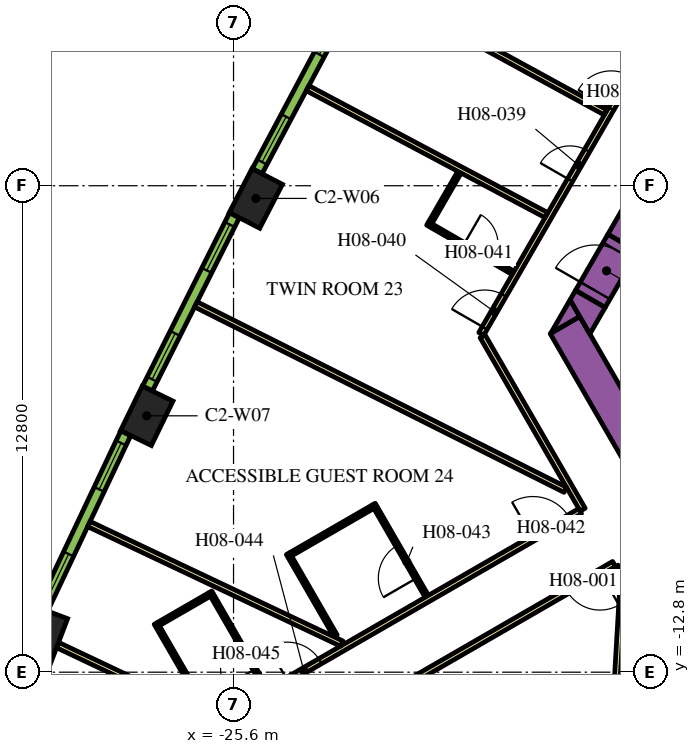
"""IFC4 building model, lengths in metres.
Left out: names, types, materials, properties, quantities, classifications, styles, units other than length and angle.
Written with IfcOpenShell. Run it as: python <this file> out.ifc"""

import sys

from ifc_helpers import new_model, si_unit, direction, frame, frame_2d, origin, origin_2d, place, context, subcontext, project, spatial, polyline, rectangle, outline, extrude, element, fill, save


model = new_model("IFC4")
c1 = context("Model", 3, precision=1e-05, world=origin(), true_north=direction((0.0, 1.0)))
c2 = subcontext(c1, "Body", "Model", "MODEL_VIEW")
j1 = project(units=[si_unit("LENGTHUNIT", "METRE"), si_unit("PLANEANGLEUNIT", "RADIAN")], contexts=[c1])
p1 = place(None, origin())
s1 = spatial("IfcSite", under=j1, at=p1, CompositionType="ELEMENT")
p2 = place(p1, origin())
s2 = spatial("IfcBuilding", under=s1, at=p2, CompositionType="ELEMENT")
p3 = place(p2, frame((0.0, 0.0, 111.0)))
s3 = spatial("IfcBuildingStorey", under=s2, at=p3, CompositionType="ELEMENT", Elevation=111.0)
for number, where, z_axis, x_axis in (
    (1, (-25.012, -0.334, 0.0), (0.0, 0.0, 1.0), (-0.459, -0.888, 0.0)),
    (2, (-27.883, -6.054, 0.0), (0.0, 0.0, 1.0), (-0.438, -0.899, 0.0)),
    (3, (-30.619, -11.839, 0.0), (0.0, 0.0, 1.0), (-0.355, -0.935, 0.0)),
):
    element("IfcColumn", number, at=place(p3, frame(where, z_axis=z_axis, x_axis=x_axis)), inside=s3, PredefinedType="COLUMN", context=c2, shape_type="SweptSolid", body=[
        extrude(rectangle(XDim=1.3, YDim=0.9, at=origin_2d()), origin(), (0.0, 0.0, 1.0), 3.9),
    ])
p4 = place(p3, frame((-15.36, -1.503, 0.0), z_axis=(0.0, 0.0, 1.0), x_axis=(0.50000389221, 0.866023156604, 0.0)))
e4 = element("IfcWall", 4, at=p4, inside=s3, PredefinedType="SOLIDWALL", context=c2, shape_type="SweptSolid", body=[
    extrude(rectangle(XDim=21.0, YDim=0.9, at=frame_2d((10.5, 0.0))), origin(), (0.0, 0.0, 1.0), 3.9),
])
p5 = place(p3, frame((-12.134, -11.883, 0.0), z_axis=(0.0, 0.0, 1.0), x_axis=(-0.500005339912, 0.866022320763, 0.0)))
e5 = element("IfcWall", 5, at=p5, inside=s3, PredefinedType="SOLIDWALL", context=c2, shape_type="SweptSolid", body=[
    extrude(rectangle(XDim=9.488, YDim=0.9, at=frame_2d((4.744, 0.0))), origin(), (0.0, 0.0, 1.0), 3.9),
])
p6 = place(p3, origin())
e6 = element("IfcWall", 6, at=p6, inside=s3, PredefinedType="SOLIDWALL", context=c2, shape_type="SweptSolid", body=[
    extrude(outline(polyline([(-16.489, -3.44), (-17.251, -3.88), (-16.743, -3.0), (-16.489, -3.44)])), origin(), (0.0, 0.0, 1.0), 3.9),
])
e7 = element("IfcWall", 7, at=p6, inside=s3, PredefinedType="SOLIDWALL", context=c2, shape_type="SweptSolid", body=[
    extrude(outline(polyline([(-15.82, -3.201), (-16.223, -3.9), (-16.743, -3.0), (-16.599, -2.751), (-15.82, -3.201)])), origin(), (0.0, 0.0, 1.0), 3.9),
])
p7 = place(p3, frame((-16.209, -2.976, 0.0), z_axis=(0.0, 0.0, 1.0), x_axis=(0.499954529098, 0.86605165483, 0.0)))
e8 = element("IfcWall", 8, at=p7, inside=s3, PredefinedType="SOLIDWALL", context=c2, shape_type="SweptSolid", body=[
    extrude(rectangle(XDim=1.7, YDim=0.9, at=frame_2d((0.85, 0.0))), origin(), (0.0, 0.0, 1.0), 3.9),
])
p8 = place(p7, frame((0.25, 0.0, 0.0)))
e9 = element("IfcOpeningElement", 9, at=p8, cuts=e8, PredefinedType="OPENING", context=c2, shape_type="SweptSolid", body=[
    extrude(rectangle(XDim=1.2, YDim=2.1, at=frame_2d((0.6, 1.05))), frame((0.0, 0.46, 0.0), z_axis=(0.0, -1.0, 0.0), x_axis=(1.0, 0.0, 0.0)), (0.0, 0.0, 1.0), 0.92),
])
p9 = place(p3, frame((-19.081, -3.9, 0.0), z_axis=(0.0, 0.0, 1.0), x_axis=(0.499998313975, 0.866026377209, 0.0)))
e10 = element("IfcWall", 10, at=p9, inside=s3, PredefinedType="PARTITIONING", context=c2, shape_type="SweptSolid", body=[
    extrude(rectangle(XDim=25.766, YDim=0.15, at=frame_2d((12.883, 0.0))), origin(), (0.0, 0.0, 1.0), 2.75),
])
p10 = place(p9, frame((19.306, 0.0, 0.0)))
e11 = element("IfcOpeningElement", 11, at=p10, cuts=e10, PredefinedType="OPENING", context=c2, shape_type="SweptSolid", body=[
    extrude(rectangle(XDim=1.0, YDim=2.1, at=frame_2d((0.5, 1.05))), frame((0.0, 0.085, 0.0), z_axis=(0.0, -1.0, 0.0), x_axis=(1.0, 0.0, 0.0)), (0.0, 0.0, 1.0), 0.17),
])
p11 = place(p9, frame((18.0, 0.0, 0.0)))
e12 = element("IfcOpeningElement", 12, at=p11, cuts=e10, PredefinedType="OPENING", context=c2, shape_type="SweptSolid", body=[
    extrude(rectangle(XDim=1.0, YDim=2.1, at=frame_2d((0.5, 1.05))), frame((0.0, 0.085, 0.0), z_axis=(0.0, -1.0, 0.0), x_axis=(1.0, 0.0, 0.0)), (0.0, 0.0, 1.0), 0.17),
])
p12 = place(p9, frame((6.838, 0.0, 0.0)))
e13 = element("IfcOpeningElement", 13, at=p12, cuts=e10, PredefinedType="OPENING", context=c2, shape_type="SweptSolid", body=[
    extrude(rectangle(XDim=1.0, YDim=2.1, at=frame_2d((0.5, 1.05))), frame((0.0, 0.085, 0.0), z_axis=(0.0, -1.0, 0.0), x_axis=(1.0, 0.0, 0.0)), (0.0, 0.0, 1.0), 0.17),
])
p13 = place(p9, frame((4.674, 0.0, 0.0)))
e14 = element("IfcOpeningElement", 14, at=p13, cuts=e10, PredefinedType="OPENING", context=c2, shape_type="SweptSolid", body=[
    extrude(rectangle(XDim=0.9, YDim=2.1, at=frame_2d((0.45, 1.05))), frame((0.0, 0.085, 0.0), z_axis=(0.0, -1.0, 0.0), x_axis=(1.0, 0.0, 0.0)), (0.0, 0.0, 1.0), 0.17),
])
p14 = place(p9, frame((0.18, 0.0, 0.0)))
e15 = element("IfcOpeningElement", 15, at=p14, cuts=e10, PredefinedType="OPENING", context=c2, shape_type="SweptSolid", body=[
    extrude(rectangle(XDim=1.0, YDim=2.1, at=frame_2d((0.5, 1.05))), frame((0.0, 0.085, 0.0), z_axis=(0.0, -1.0, 0.0), x_axis=(1.0, 0.0, 0.0)), (0.0, 0.0, 1.0), 0.17),
])
p15 = place(p3, frame((-16.412, -8.523, 0.0), z_axis=(0.0, 0.0, 1.0), x_axis=(-0.500001929737, 0.866024289647, 0.0)))
e16 = element("IfcWall", 16, at=p15, inside=s3, PredefinedType="PARTITIONING", context=c2, shape_type="SweptSolid", body=[
    extrude(rectangle(XDim=5.268, YDim=0.15, at=frame_2d((2.634, 0.0))), origin(), (0.0, 0.0, 1.0), 2.75),
])
p16 = place(p3, frame((-28.211, -15.335, 0.0), z_axis=(0.0, 0.0, 1.0), x_axis=(0.866025884867, 0.49999916674, 0.0)))
e17 = element("IfcWall", 17, at=p16, inside=s3, PredefinedType="PARTITIONING", context=c2, shape_type="SweptSolid", body=[
    extrude(rectangle(XDim=13.543, YDim=0.15, at=frame_2d((6.772, 0.0))), origin(), (0.0, 0.0, 1.0), 2.75),
])
p17 = place(p16, frame((12.114, 0.0, 0.0)))
e18 = element("IfcOpeningElement", 18, at=p17, cuts=e17, PredefinedType="OPENING", context=c2, shape_type="SweptSolid", body=[
    extrude(rectangle(XDim=1.1, YDim=2.1, at=frame_2d((0.55, 1.05))), frame((0.0, 0.085, 0.0), z_axis=(0.0, -1.0, 0.0), x_axis=(1.0, 0.0, 0.0)), (0.0, 0.0, 1.0), 0.17),
])
p18 = place(p16, frame((4.65, 0.0, 0.0)))
e19 = element("IfcOpeningElement", 19, at=p18, cuts=e17, PredefinedType="OPENING", context=c2, shape_type="SweptSolid", body=[
    extrude(rectangle(XDim=1.0, YDim=2.1, at=frame_2d((0.5, 1.05))), frame((0.0, 0.085, 0.0), z_axis=(0.0, -1.0, 0.0), x_axis=(1.0, 0.0, 0.0)), (0.0, 0.0, 1.0), 0.17),
])
p19 = place(p3, frame((-15.587, -9.952, 0.0), z_axis=(0.0, 0.0, 1.0), x_axis=(-0.866017869832, -0.500013048961, 0.0)))
e20 = element("IfcWall", 20, at=p19, inside=s3, PredefinedType="PARTITIONING", context=c2, shape_type="SweptSolid", body=[
    extrude(rectangle(XDim=13.624, YDim=0.15, at=frame_2d((6.812, 0.0))), origin(), (0.0, 0.0, 1.0), 2.75),
])
p20 = place(p19, frame((0.427, 0.0, 0.0)))
e21 = element("IfcOpeningElement", 21, at=p20, cuts=e20, PredefinedType="OPENING", context=c2, shape_type="SweptSolid", body=[
    extrude(rectangle(XDim=1.0, YDim=2.1, at=frame_2d((0.5, 1.05))), frame((0.0, 0.085, 0.0), z_axis=(0.0, -1.0, 0.0), x_axis=(1.0, 0.0, 0.0)), (0.0, 0.0, 1.0), 0.17),
])
p21 = place(p3, frame((-12.918, -14.575, 0.0), z_axis=(0.0, 0.0, 1.0), x_axis=(-0.500009150678, 0.866020120573, 0.0)))
e22 = element("IfcWall", 22, at=p21, inside=s3, PredefinedType="PARTITIONING", context=c2, shape_type="SweptSolid", body=[
    extrude(rectangle(XDim=5.258, YDim=0.15, at=frame_2d((2.629, 0.0))), origin(), (0.0, 0.0, 1.0), 2.75),
])
p22 = place(p3, frame((-30.231, -12.085, 0.0), z_axis=(0.0, 0.0, 1.0), x_axis=(0.904001132572, -0.427530060122, 0.0)))
e23 = element("IfcWall", 23, at=p22, inside=s3, PredefinedType="PARTITIONING", context=c2, shape_type="SweptSolid", body=[
    extrude(rectangle(XDim=4.51, YDim=0.15, at=frame_2d((2.255, 0.0))), origin(), (0.0, 0.0, 1.0), 2.75),
])
p23 = place(p3, frame((-29.406, -8.901, 0.0), z_axis=(0.0, 0.0, 1.0), x_axis=(0.904002363742, -0.427527456836, 0.0)))
e24 = element("IfcWall", 24, at=p23, inside=s3, PredefinedType="PARTITIONING", context=c2, shape_type="SweptSolid", body=[
    extrude(rectangle(XDim=7.362, YDim=0.15, at=frame_2d((3.681, 0.0))), origin(), (0.0, 0.0, 1.0), 2.75),
])
p24 = place(p3, frame((-23.652, 2.567, 0.0), z_axis=(0.0, 0.0, 1.0), x_axis=(0.883019237957, -0.469336793144, 0.0)))
e25 = element("IfcWall", 25, at=p24, inside=s3, PredefinedType="PARTITIONING", context=c2, shape_type="SweptSolid", body=[
    extrude(rectangle(XDim=7.111, YDim=0.15, at=frame_2d((3.555, 0.0))), origin(), (0.0, 0.0, 1.0), 2.75),
])
p25 = place(p3, frame((-26.591, -3.122, 0.0), z_axis=(0.0, 0.0, 1.0), x_axis=(0.893766213273, -0.448533115847, 0.0)))
e26 = element("IfcWall", 26, at=p25, inside=s3, PredefinedType="PARTITIONING", context=c2, shape_type="SweptSolid", body=[
    extrude(rectangle(XDim=10.875, YDim=0.15, at=frame_2d((5.438, 0.0))), origin(), (0.0, 0.0, 1.0), 2.75),
])
p26 = place(p3, frame((-21.614, 5.102, 0.0), z_axis=(0.0, 0.0, 1.0), x_axis=(0.877484555087, -0.479604895287, 0.0)))
e27 = element("IfcWall", 27, at=p26, inside=s3, PredefinedType="PARTITIONING", context=c2, shape_type="SweptSolid", body=[
    extrude(rectangle(XDim=6.611, YDim=0.15, at=frame_2d((3.306, 0.0))), origin(), (0.0, 0.0, 1.0), 2.75),
])
p27 = place(p3, frame((-15.999, -21.467, 0.0), z_axis=(0.0, 0.0, 1.0), x_axis=(0.058411453297, 0.998292593443, 0.0)))
e28 = element("IfcWall", 28, at=p27, inside=s3, PredefinedType="PARTITIONING", context=c2, shape_type="SweptSolid", body=[
    extrude(rectangle(XDim=10.875, YDim=0.15, at=frame_2d((5.438, 0.0))), origin(), (0.0, 0.0, 1.0), 2.75),
])
p28 = place(p3, frame((-20.492, -0.994, 0.0), z_axis=(0.0, 0.0, 1.0), x_axis=(0.865997922154, -0.500047596559, 0.0)))
e29 = element("IfcWall", 29, at=p28, inside=s3, PredefinedType="PARTITIONING", context=c2, shape_type="SweptSolid", body=[
    extrude(rectangle(XDim=2.6, YDim=0.1, at=frame_2d((1.3, 0.0))), origin(), (0.0, 0.0, 1.0), 2.75),
])
p29 = place(p28, frame((1.1, 0.0, 0.0)))
e30 = element("IfcOpeningElement", 30, at=p29, cuts=e29, PredefinedType="OPENING", context=c2, shape_type="SweptSolid", body=[
    extrude(rectangle(XDim=0.9, YDim=2.1, at=frame_2d((0.45, 1.05))), frame((0.0, 0.06, 0.0), z_axis=(0.0, -1.0, 0.0), x_axis=(1.0, 0.0, 0.0)), (0.0, 0.0, 1.0), 0.12),
])
p30 = place(p3, frame((-20.424, -0.976, 0.0), z_axis=(0.0, 0.0, 1.0), x_axis=(0.500086174919, 0.865975644955, 0.0)))
e31 = element("IfcWall", 31, at=p30, inside=s3, PredefinedType="PARTITIONING", context=c2, shape_type="SweptSolid", body=[
    extrude(rectangle(XDim=1.53, YDim=0.1, at=frame_2d((0.765, 0.0))), origin(), (0.0, 0.0, 1.0), 2.75),
])
p31 = place(p3, frame((-20.515, -10.805, 0.0), z_axis=(0.0, 0.0, 1.0), x_axis=(-0.49994636267, 0.866056369097, 0.0)))
e32 = element("IfcWall", 32, at=p31, inside=s3, PredefinedType="PARTITIONING", context=c2, shape_type="SweptSolid", body=[
    extrude(rectangle(XDim=2.8, YDim=0.1, at=frame_2d((1.4, 0.0))), origin(), (0.0, 0.0, 1.0), 2.75),
])
p32 = place(p31, frame((0.55, 0.0, 0.0)))
e33 = element("IfcOpeningElement", 33, at=p32, cuts=e32, PredefinedType="OPENING", context=c2, shape_type="SweptSolid", body=[
    extrude(rectangle(XDim=1.0, YDim=2.1, at=frame_2d((0.5, 1.05))), frame((0.0, 0.06, 0.0), z_axis=(0.0, -1.0, 0.0), x_axis=(1.0, 0.0, 0.0)), (0.0, 0.0, 1.0), 0.12),
])
for number, where, z_axis, x_axis in (
    (34, (-21.933, -8.448, 0.0), (0.0, 0.0, 1.0), (-0.866, -0.5, 0.0)),
    (35, (-22.916, -11.845, 0.0), (0.0, 0.0, 1.0), (-0.5, 0.866, 0.0)),
):
    element("IfcWall", number, at=place(p3, frame(where, z_axis=z_axis, x_axis=x_axis)), inside=s3, PredefinedType="PARTITIONING", context=c2, shape_type="SweptSolid", body=[
        extrude(rectangle(XDim=2.5, YDim=0.1, at=frame_2d((1.25, 0.0))), origin(), (0.0, 0.0, 1.0), 2.75),
    ])
p33 = place(p3, frame((-24.74, -13.244, 0.0), z_axis=(0.0, 0.0, 1.0), x_axis=(-0.500037662692, 0.866003658127, 0.0)))
e36 = element("IfcWall", 36, at=p33, inside=s3, PredefinedType="PARTITIONING", context=c2, shape_type="SweptSolid", body=[
    extrude(rectangle(XDim=2.95, YDim=0.1, at=frame_2d((1.475, 0.0))), origin(), (0.0, 0.0, 1.0), 2.75),
])
p34 = place(p33, frame((0.6, 0.0, 0.0)))
e37 = element("IfcOpeningElement", 37, at=p34, cuts=e36, PredefinedType="OPENING", context=c2, shape_type="SweptSolid", body=[
    extrude(rectangle(XDim=0.9, YDim=2.1, at=frame_2d((0.45, 1.05))), frame((0.0, 0.06, 0.0), z_axis=(0.0, -1.0, 0.0), x_axis=(1.0, 0.0, 0.0)), (0.0, 0.0, 1.0), 0.12),
])
p35 = place(p3, frame((-26.233, -10.758, 0.0), z_axis=(0.0, 0.0, 1.0), x_axis=(-0.866043940782, -0.499967891604, 0.0)))
e38 = element("IfcWall", 38, at=p35, inside=s3, PredefinedType="PARTITIONING", context=c2, shape_type="SweptSolid", body=[
    extrude(rectangle(XDim=1.55, YDim=0.1, at=frame_2d((0.775, 0.0))), origin(), (0.0, 0.0, 1.0), 2.75),
])
p36 = place(p3, frame((-26.319, -13.81, 0.0), z_axis=(0.0, 0.0, 1.0), x_axis=(-0.499953715521, 0.866052124492, 0.0)))
e39 = element("IfcWall", 39, at=p36, inside=s3, PredefinedType="PARTITIONING", context=c2, shape_type="SweptSolid", body=[
    extrude(rectangle(XDim=2.65, YDim=0.1, at=frame_2d((1.325, 0.0))), origin(), (0.0, 0.0, 1.0), 2.75),
])
p37 = place(p3, frame((-22.583, 4.887, 0.0), z_axis=(0.0, 0.0, 1.0), x_axis=(-0.469323203119, -0.883026461106, 0.0)))
e40 = element("IfcWall", 40, at=p37, inside=s3, PredefinedType="SOLIDWALL", context=c2, shape_type="SweptSolid", body=[
    extrude(rectangle(XDim=5.101, YDim=0.29, at=frame_2d((2.55, 0.0))), origin(), (0.0, 0.0, 1.0), 3.65),
])
p38 = place(p37, frame((0.273, 0.0, 0.9)))
e41 = element("IfcOpeningElement", 41, at=p38, cuts=e40, PredefinedType="OPENING", context=c2, shape_type="SweptSolid", body=[
    extrude(rectangle(XDim=1.35, YDim=2.15, at=frame_2d((0.675, 1.075))), frame((0.0, 0.155, 0.0), z_axis=(0.0, -1.0, 0.0), x_axis=(1.0, 0.0, 0.0)), (0.0, 0.0, 1.0), 0.31),
])
p39 = place(p37, frame((3.478, 0.0, 0.9)))
e42 = element("IfcOpeningElement", 42, at=p39, cuts=e40, PredefinedType="OPENING", context=c2, shape_type="SweptSolid", body=[
    extrude(rectangle(XDim=1.35, YDim=2.15, at=frame_2d((0.675, 1.075))), frame((0.0, 0.155, 0.0), z_axis=(0.0, -1.0, 0.0), x_axis=(1.0, 0.0, 0.0)), (0.0, 0.0, 1.0), 0.31),
])
p40 = place(p3, frame((-25.576, -0.778, 0.0), z_axis=(0.0, 0.0, 1.0), x_axis=(-0.448534297211, -0.893765620409, 0.0)))
e43 = element("IfcWall", 43, at=p40, inside=s3, PredefinedType="SOLIDWALL", context=c2, shape_type="SweptSolid", body=[
    extrude(rectangle(XDim=5.1, YDim=0.29, at=frame_2d((2.55, 0.0))), origin(), (0.0, 0.0, 1.0), 3.65),
])
p41 = place(p40, frame((0.272, 0.0, 0.9)))
e44 = element("IfcOpeningElement", 44, at=p41, cuts=e43, PredefinedType="OPENING", context=c2, shape_type="SweptSolid", body=[
    extrude(rectangle(XDim=1.35, YDim=2.15, at=frame_2d((0.675, 1.075))), frame((0.0, 0.155, 0.0), z_axis=(0.0, -1.0, 0.0), x_axis=(1.0, 0.0, 0.0)), (0.0, 0.0, 1.0), 0.31),
])
p42 = place(p40, frame((3.478, 0.0, 0.9)))
e45 = element("IfcOpeningElement", 45, at=p42, cuts=e43, PredefinedType="OPENING", context=c2, shape_type="SweptSolid", body=[
    extrude(rectangle(XDim=1.35, YDim=2.15, at=frame_2d((0.675, 1.075))), frame((0.0, 0.155, 0.0), z_axis=(0.0, -1.0, 0.0), x_axis=(1.0, 0.0, 0.0)), (0.0, 0.0, 1.0), 0.31),
])
p43 = place(p3, frame((-28.436, -6.511, 0.0), z_axis=(0.0, 0.0, 1.0), x_axis=(-0.427543726596, -0.903994669148, 0.0)))
e46 = element("IfcWall", 46, at=p43, inside=s3, PredefinedType="SOLIDWALL", context=c2, shape_type="SweptSolid", body=[
    extrude(rectangle(XDim=5.107, YDim=0.29, at=frame_2d((2.553, 0.0))), origin(), (0.0, 0.0, 1.0), 3.65),
])
p44 = place(p43, frame((0.285, 0.0, 0.9)))
e47 = element("IfcOpeningElement", 47, at=p44, cuts=e46, PredefinedType="OPENING", context=c2, shape_type="SweptSolid", body=[
    extrude(rectangle(XDim=1.35, YDim=2.15, at=frame_2d((0.675, 1.075))), frame((0.0, 0.155, 0.0), z_axis=(0.0, -1.0, 0.0), x_axis=(1.0, 0.0, 0.0)), (0.0, 0.0, 1.0), 0.31),
])
p45 = place(p43, frame((3.516, 0.0, 0.9)))
e48 = element("IfcOpeningElement", 48, at=p45, cuts=e46, PredefinedType="OPENING", context=c2, shape_type="SweptSolid", body=[
    extrude(rectangle(XDim=1.35, YDim=2.15, at=frame_2d((0.675, 1.075))), frame((0.0, 0.155, 0.0), z_axis=(0.0, -1.0, 0.0), x_axis=(1.0, 0.0, 0.0)), (0.0, 0.0, 1.0), 0.31),
])
p46 = place(p8, origin())
e49 = element("IfcDoor", 49, at=p46, inside=s3, OperationType="SINGLE_SWING_LEFT", PredefinedType="DOOR", context=c2, shape_type="SweptSolid", body=[
    extrude(rectangle(XDim=1.2, YDim=2.1, at=frame_2d((0.6, 1.05))), frame((0.0, 0.025, 0.0), z_axis=(0.0, -1.0, 0.0), x_axis=(1.0, 0.0, 0.0)), (0.0, 0.0, 1.0), 0.05),
])
fill(e9, e49)
p47 = place(p20, origin())
e50 = element("IfcDoor", 50, at=p47, inside=s3, OperationType="SINGLE_SWING_LEFT", PredefinedType="DOOR", context=c2, shape_type="SweptSolid", body=[
    extrude(rectangle(XDim=1.0, YDim=2.1, at=frame_2d((0.5, 1.05))), frame((0.0, 0.025, 0.0), z_axis=(0.0, -1.0, 0.0), x_axis=(1.0, 0.0, 0.0)), (0.0, 0.0, 1.0), 0.05),
])
fill(e21, e50)
p48 = place(p12, origin())
e51 = element("IfcDoor", 51, at=p48, inside=s3, OperationType="SINGLE_SWING_LEFT", PredefinedType="DOOR", context=c2, shape_type="SweptSolid", body=[
    extrude(rectangle(XDim=1.0, YDim=2.1, at=frame_2d((0.5, 1.05))), frame((0.0, 0.025, 0.0), z_axis=(0.0, -1.0, 0.0), x_axis=(1.0, 0.0, 0.0)), (0.0, 0.0, 1.0), 0.05),
])
fill(e13, e51)
p49 = place(p13, origin())
e52 = element("IfcDoor", 52, at=p49, inside=s3, OperationType="SINGLE_SWING_RIGHT", PredefinedType="DOOR", context=c2, shape_type="SweptSolid", body=[
    extrude(rectangle(XDim=0.9, YDim=2.1, at=frame_2d((0.45, 1.05))), frame((0.0, 0.025, 0.0), z_axis=(0.0, -1.0, 0.0), x_axis=(1.0, 0.0, 0.0)), (0.0, 0.0, 1.0), 0.05),
])
fill(e14, e52)
p50 = place(p14, origin())
e53 = element("IfcDoor", 53, at=p50, inside=s3, OperationType="SINGLE_SWING_LEFT", PredefinedType="DOOR", context=c2, shape_type="SweptSolid", body=[
    extrude(rectangle(XDim=1.0, YDim=2.1, at=frame_2d((0.5, 1.05))), frame((0.0, 0.025, 0.0), z_axis=(0.0, -1.0, 0.0), x_axis=(1.0, 0.0, 0.0)), (0.0, 0.0, 1.0), 0.05),
])
fill(e15, e53)
p51 = place(p29, origin())
e54 = element("IfcDoor", 54, at=p51, inside=s3, OperationType="SINGLE_SWING_LEFT", PredefinedType="DOOR", context=c2, shape_type="SweptSolid", body=[
    extrude(rectangle(XDim=0.9, YDim=2.1, at=frame_2d((0.45, 1.05))), frame((0.0, 0.025, 0.0), z_axis=(0.0, -1.0, 0.0), x_axis=(1.0, 0.0, 0.0)), (0.0, 0.0, 1.0), 0.05),
])
fill(e30, e54)
p52 = place(p17, origin())
e55 = element("IfcDoor", 55, at=p52, inside=s3, OperationType="SINGLE_SWING_RIGHT", PredefinedType="DOOR", context=c2, shape_type="SweptSolid", body=[
    extrude(rectangle(XDim=1.1, YDim=2.1, at=frame_2d((0.55, 1.05))), frame((0.0, 0.025, 0.0), z_axis=(0.0, -1.0, 0.0), x_axis=(1.0, 0.0, 0.0)), (0.0, 0.0, 1.0), 0.05),
])
fill(e18, e55)
p53 = place(p32, origin())
e56 = element("IfcDoor", 56, at=p53, inside=s3, OperationType="SINGLE_SWING_RIGHT", PredefinedType="DOOR", context=c2, shape_type="SweptSolid", body=[
    extrude(rectangle(XDim=1.0, YDim=2.1, at=frame_2d((0.5, 1.05))), frame((0.0, 0.025, 0.0), z_axis=(0.0, -1.0, 0.0), x_axis=(1.0, 0.0, 0.0)), (0.0, 0.0, 1.0), 0.05),
])
fill(e33, e56)
p54 = place(p18, origin())
e57 = element("IfcDoor", 57, at=p54, inside=s3, OperationType="SINGLE_SWING_RIGHT", PredefinedType="DOOR", context=c2, shape_type="SweptSolid", body=[
    extrude(rectangle(XDim=1.0, YDim=2.1, at=frame_2d((0.5, 1.05))), frame((0.0, 0.025, 0.0), z_axis=(0.0, -1.0, 0.0), x_axis=(1.0, 0.0, 0.0)), (0.0, 0.0, 1.0), 0.05),
])
fill(e19, e57)
p55 = place(p34, origin())
e58 = element("IfcDoor", 58, at=p55, inside=s3, OperationType="SINGLE_SWING_LEFT", PredefinedType="DOOR", context=c2, shape_type="SweptSolid", body=[
    extrude(rectangle(XDim=0.9, YDim=2.1, at=frame_2d((0.45, 1.05))), frame((0.0, 0.025, 0.0), z_axis=(0.0, -1.0, 0.0), x_axis=(1.0, 0.0, 0.0)), (0.0, 0.0, 1.0), 0.05),
])
fill(e37, e58)
p56 = place(p38, origin())
e59 = element("IfcWindow", 59, at=p56, inside=s3, PartitioningType="DOUBLE_PANEL_VERTICAL", PredefinedType="WINDOW", context=c2, shape_type="SweptSolid", body=[
    extrude(rectangle(XDim=1.35, YDim=2.15, at=frame_2d((0.675, 1.075))), frame((0.0, 0.015, 0.0), z_axis=(0.0, -1.0, 0.0), x_axis=(1.0, 0.0, 0.0)), (0.0, 0.0, 1.0), 0.06),
])
fill(e41, e59)
p57 = place(p39, origin())
e60 = element("IfcWindow", 60, at=p57, inside=s3, PartitioningType="DOUBLE_PANEL_VERTICAL", PredefinedType="WINDOW", context=c2, shape_type="SweptSolid", body=[
    extrude(rectangle(XDim=1.35, YDim=2.15, at=frame_2d((0.675, 1.075))), frame((0.0, 0.015, 0.0), z_axis=(0.0, -1.0, 0.0), x_axis=(1.0, 0.0, 0.0)), (0.0, 0.0, 1.0), 0.06),
])
fill(e42, e60)
p58 = place(p41, origin())
e61 = element("IfcWindow", 61, at=p58, inside=s3, PartitioningType="DOUBLE_PANEL_VERTICAL", PredefinedType="WINDOW", context=c2, shape_type="SweptSolid", body=[
    extrude(rectangle(XDim=1.35, YDim=2.15, at=frame_2d((0.675, 1.075))), frame((0.0, 0.015, 0.0), z_axis=(0.0, -1.0, 0.0), x_axis=(1.0, 0.0, 0.0)), (0.0, 0.0, 1.0), 0.06),
])
fill(e44, e61)
p59 = place(p42, origin())
e62 = element("IfcWindow", 62, at=p59, inside=s3, PartitioningType="DOUBLE_PANEL_VERTICAL", PredefinedType="WINDOW", context=c2, shape_type="SweptSolid", body=[
    extrude(rectangle(XDim=1.35, YDim=2.15, at=frame_2d((0.675, 1.075))), frame((0.0, 0.015, 0.0), z_axis=(0.0, -1.0, 0.0), x_axis=(1.0, 0.0, 0.0)), (0.0, 0.0, 1.0), 0.06),
])
fill(e45, e62)
p60 = place(p44, origin())
e63 = element("IfcWindow", 63, at=p60, inside=s3, PartitioningType="DOUBLE_PANEL_VERTICAL", PredefinedType="WINDOW", context=c2, shape_type="SweptSolid", body=[
    extrude(rectangle(XDim=1.35, YDim=2.15, at=frame_2d((0.675, 1.075))), frame((0.0, 0.015, 0.0), z_axis=(0.0, -1.0, 0.0), x_axis=(1.0, 0.0, 0.0)), (0.0, 0.0, 1.0), 0.06),
])
fill(e47, e63)
p61 = place(p45, origin())
e64 = element("IfcWindow", 64, at=p61, inside=s3, PartitioningType="DOUBLE_PANEL_VERTICAL", PredefinedType="WINDOW", context=c2, shape_type="SweptSolid", body=[
    extrude(rectangle(XDim=1.35, YDim=2.15, at=frame_2d((0.675, 1.075))), frame((0.0, 0.015, 0.0), z_axis=(0.0, -1.0, 0.0), x_axis=(1.0, 0.0, 0.0)), (0.0, 0.0, 1.0), 0.06),
])
fill(e48, e64)
save(model, sys.argv[1])
